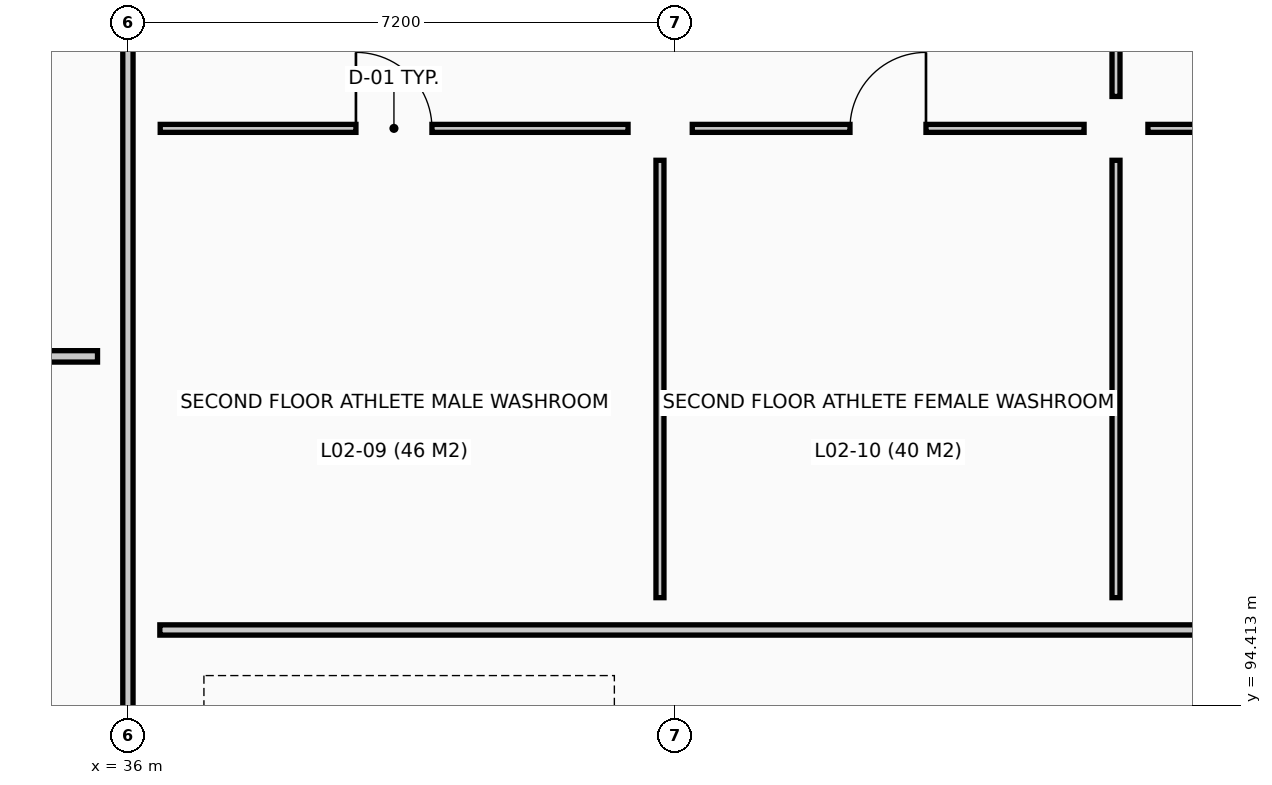
"""IFC4 building model, lengths in metres.
Left out: names, types, materials, properties, quantities, classifications, styles, units other than length and angle.
Written with IfcOpenShell. Run it as: python <this file> out.ifc"""

import sys

from ifc_helpers import new_model, si_unit, direction, frame, frame_2d, origin, place, context, subcontext, project, spatial, rectangle, extrude, element, fill, save


model = new_model("IFC4")
c1 = context("Model", 3, precision=1e-05, world=origin(), true_north=direction((0.0, 1.0)))
c2 = subcontext(c1, "Body", "Model", "MODEL_VIEW")
j1 = project(units=[si_unit("LENGTHUNIT", "METRE"), si_unit("PLANEANGLEUNIT", "RADIAN")], contexts=[c1])
p1 = place(None, origin())
s1 = spatial("IfcSite", under=j1, at=p1, CompositionType="ELEMENT")
p2 = place(p1, origin())
s2 = spatial("IfcBuilding", under=s1, at=p2, CompositionType="ELEMENT")
p3 = place(p2, frame((0.0, 0.0, 9.6)))
s3 = spatial("IfcBuildingStorey", under=s2, at=p3, CompositionType="ELEMENT", Elevation=9.6)
p4 = place(p3, frame((36.0, 90.82, 0.0), z_axis=(0.0, 0.0, 1.0), x_axis=(0.0, 1.0, 0.0)))
e1 = element("IfcWall", 1, at=p4, inside=s3, PredefinedType="PARTITIONING", context=c2, shape_type="SweptSolid", body=[
    extrude(rectangle(XDim=18.76, YDim=0.135, at=frame_2d((9.38, 0.0))), origin(), (0.0, 0.0, 1.0), 3.89),
])
p5 = place(p3, frame((36.42, 95.4, 0.0), z_axis=(0.0, 0.0, 1.0), x_axis=(1.0, 0.0, 0.0)))
e2 = element("IfcWall", 2, at=p5, inside=s3, PredefinedType="PARTITIONING", context=c2, shape_type="SweptSolid", body=[
    extrude(rectangle(XDim=15.16, YDim=0.135, at=frame_2d((7.58, 0.0))), origin(), (0.0, 0.0, 1.0), 4.545),
])
p6 = place(p3, frame((36.425, 102.0, 0.0), z_axis=(0.0, 0.0, 1.0), x_axis=(1.0, 0.0, 0.0)))
e3 = element("IfcWall", 3, at=p6, inside=s3, PredefinedType="PARTITIONING", context=c2, shape_type="SweptSolid", body=[
    extrude(rectangle(XDim=6.155, YDim=0.105, at=frame_2d((3.078, 0.0))), origin(), (0.0, 0.0, 1.0), 4.545),
])
p7 = place(p6, frame((2.575, 0.0, 0.0)))
e4 = element("IfcOpeningElement", 4, at=p7, cuts=e3, PredefinedType="OPENING", context=c2, shape_type="SweptSolid", body=[
    extrude(rectangle(XDim=1.0, YDim=2.1, at=frame_2d((0.5, 1.05))), frame((0.0, 0.062, 0.0), z_axis=(0.0, -1.0, 0.0), x_axis=(1.0, 0.0, 0.0)), (0.0, 0.0, 1.0), 0.125),
])
p8 = place(p3, frame((43.0, 95.825, 0.0), z_axis=(0.0, 0.0, 1.0), x_axis=(0.0, 1.0, 0.0)))
e5 = element("IfcWall", 5, at=p8, inside=s3, PredefinedType="PARTITIONING", context=c2, shape_type="SweptSolid", body=[
    extrude(rectangle(XDim=5.755, YDim=0.105, at=frame_2d((2.877, 0.0))), origin(), (0.0, 0.0, 1.0), 3.89),
])
p9 = place(p3, frame((43.425, 102.0, 0.0), z_axis=(0.0, 0.0, 1.0), x_axis=(1.0, 0.0, 0.0)))
e6 = element("IfcWall", 6, at=p9, inside=s3, PredefinedType="PARTITIONING", context=c2, shape_type="SweptSolid", body=[
    extrude(rectangle(XDim=5.155, YDim=0.105, at=frame_2d((2.578, 0.0))), origin(), (0.0, 0.0, 1.0), 4.545),
])
p10 = place(p9, frame((2.075, 0.0, 0.0)))
e7 = element("IfcOpeningElement", 7, at=p10, cuts=e6, PredefinedType="OPENING", context=c2, shape_type="SweptSolid", body=[
    extrude(rectangle(XDim=1.0, YDim=2.1, at=frame_2d((0.5, 1.05))), frame((0.0, 0.062, 0.0), z_axis=(0.0, -1.0, 0.0), x_axis=(1.0, 0.0, 0.0)), (0.0, 0.0, 1.0), 0.125),
])
p11 = place(p3, frame((49.0, 95.825, 0.0), z_axis=(0.0, 0.0, 1.0), x_axis=(0.0, 1.0, 0.0)))
e8 = element("IfcWall", 8, at=p11, inside=s3, PredefinedType="PARTITIONING", context=c2, shape_type="SweptSolid", body=[
    extrude(rectangle(XDim=5.755, YDim=0.105, at=frame_2d((2.877, 0.0))), origin(), (0.0, 0.0, 1.0), 4.545),
])
p12 = place(p3, frame((49.42, 102.0, 0.0), z_axis=(0.0, 0.0, 1.0), x_axis=(1.0, 0.0, 0.0)))
e9 = element("IfcWall", 9, at=p12, inside=s3, PredefinedType="PARTITIONING", context=c2, shape_type="SweptSolid", body=[
    extrude(rectangle(XDim=2.56, YDim=0.105, at=frame_2d((1.28, 0.0))), origin(), (0.0, 0.0, 1.0), 4.545),
])
p13 = place(p12, frame((0.755, 0.0, 0.0)))
e10 = element("IfcOpeningElement", 10, at=p13, cuts=e9, PredefinedType="OPENING", context=c2, shape_type="SweptSolid", body=[
    extrude(rectangle(XDim=1.05, YDim=2.15, at=frame_2d((0.525, 1.075))), frame((0.0, 0.062, 0.0), z_axis=(0.0, -1.0, 0.0), x_axis=(1.0, 0.0, 0.0)), (0.0, 0.0, 1.0), 0.125),
])
p14 = place(p3, frame((49.0, 102.42, 0.0), z_axis=(0.0, 0.0, 1.0), x_axis=(0.0, 1.0, 0.0)))
e11 = element("IfcWall", 11, at=p14, inside=s3, PredefinedType="PARTITIONING", context=c2, shape_type="SweptSolid", body=[
    extrude(rectangle(XDim=2.56, YDim=0.105, at=frame_2d((1.28, 0.0))), origin(), (0.0, 0.0, 1.0), 4.545),
])
p15 = place(p3, frame((15.0, 99.0, 0.0), z_axis=(0.0, 0.0, 1.0), x_axis=(1.0, 0.0, 0.0)))
e12 = element("IfcWall", 12, at=p15, inside=s3, PredefinedType="MOVABLE", context=c2, shape_type="SweptSolid", body=[
    extrude(rectangle(XDim=20.6, YDim=0.15, at=frame_2d((10.3, 0.0))), origin(), (0.0, 0.0, 1.0), 4.285),
])
p16 = place(p7, frame((1.0, 0.0, 0.0), z_axis=(0.0, 0.0, 1.0), x_axis=(-1.0, 0.0, 0.0)))
e13 = element("IfcDoor", 13, at=p16, inside=s3, OperationType="SINGLE_SWING_RIGHT", PredefinedType="DOOR", context=c2, shape_type="SweptSolid", body=[
    extrude(rectangle(XDim=1.0, YDim=2.1, at=frame_2d((0.5, 1.05))), frame((0.0, 0.025, 0.0), z_axis=(0.0, -1.0, 0.0), x_axis=(1.0, 0.0, 0.0)), (0.0, 0.0, 1.0), 0.05),
])
fill(e4, e13)
p17 = place(p10, frame((1.0, 0.0, 0.0), z_axis=(0.0, 0.0, 1.0), x_axis=(-1.0, 0.0, 0.0)))
e14 = element("IfcDoor", 14, at=p17, inside=s3, OperationType="SINGLE_SWING_LEFT", PredefinedType="DOOR", context=c2, shape_type="SweptSolid", body=[
    extrude(rectangle(XDim=1.0, YDim=2.1, at=frame_2d((0.5, 1.05))), frame((0.0, 0.025, 0.0), z_axis=(0.0, -1.0, 0.0), x_axis=(1.0, 0.0, 0.0)), (0.0, 0.0, 1.0), 0.05),
])
fill(e7, e14)
save(model, sys.argv[1])
